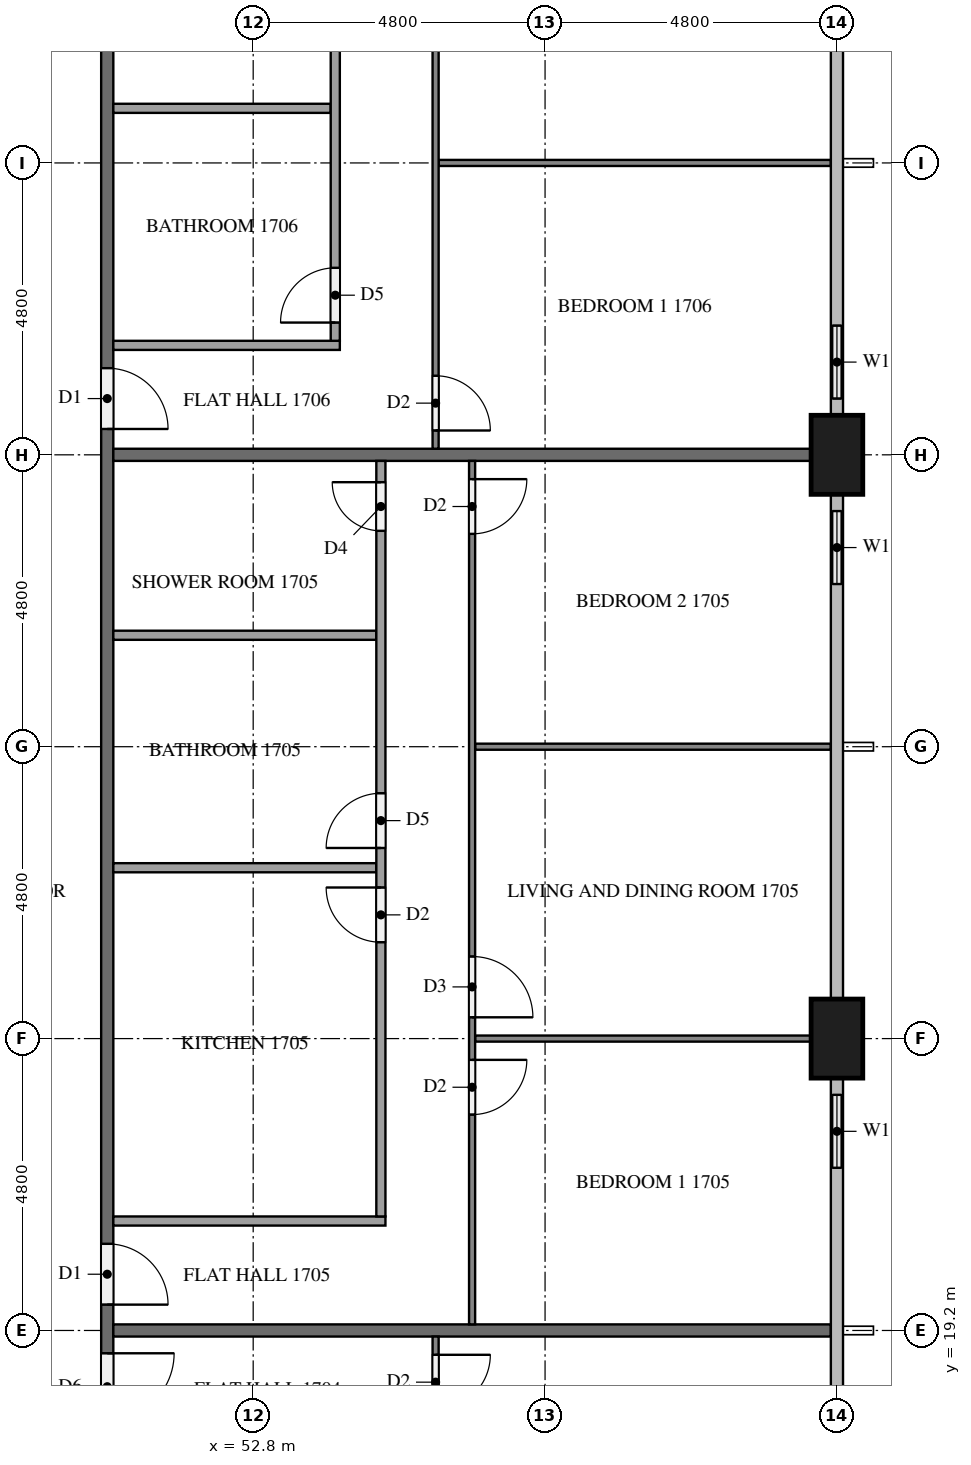
"""IFC4 building model, lengths in metres.
Left out: names, types, materials, properties, quantities, classifications, styles, units other than length and angle.
Written with IfcOpenShell. Run it as: python <this file> out.ifc"""

import sys

from ifc_helpers import new_model, si_unit, direction, frame, frame_2d, origin, origin_2d, place, context, subcontext, project, spatial, rectangle, extrude, element, fill, save


model = new_model("IFC4")
c1 = context("Model", 3, precision=1e-05, world=origin(), true_north=direction((0.0, 1.0)))
c2 = subcontext(c1, "Body", "Model", "MODEL_VIEW")
j1 = project(units=[si_unit("LENGTHUNIT", "METRE"), si_unit("PLANEANGLEUNIT", "RADIAN")], contexts=[c1])
p1 = place(None, origin())
s1 = spatial("IfcSite", under=j1, at=p1, CompositionType="ELEMENT")
p2 = place(p1, origin())
s2 = spatial("IfcBuilding", under=s1, at=p2, CompositionType="ELEMENT")
p3 = place(p2, frame((0.0, 0.0, 69.8)))
s3 = spatial("IfcBuildingStorey", under=s2, at=p3, CompositionType="ELEMENT", Elevation=69.8)
for number, where, z_axis, x_axis in (
    (1, (62.4, 24.0, 0.0), (0.0, 0.0, 1.0), (0.0, 1.0, 0.0)),
    (2, (62.4, 33.6, 0.0), (0.0, 0.0, 1.0), (0.0, 1.0, 0.0)),
):
    element("IfcColumn", number, at=place(p3, frame(where, z_axis=z_axis, x_axis=x_axis)), inside=s3, PredefinedType="COLUMN", context=c2, shape_type="SweptSolid", body=[
        extrude(rectangle(XDim=1.3, YDim=0.85, at=origin_2d()), origin(), (0.0, 0.0, 1.0), 3.2),
    ])
p4 = place(p3, frame((62.4, 21.6, 0.0), z_axis=(0.0, 0.0, 1.0), x_axis=(0.0, 1.0, 0.0)))
e3 = element("IfcWall", 3, at=p4, inside=s3, PredefinedType="SOLIDWALL", context=c2, shape_type="SweptSolid", body=[
    extrude(rectangle(XDim=1.75, YDim=0.15, at=frame_2d((0.875, 0.0))), origin(), (0.0, 0.0, 1.0), 3.2),
])
p5 = place(p4, frame((0.275, 0.0, 0.9)))
e4 = element("IfcOpeningElement", 4, at=p5, cuts=e3, PredefinedType="OPENING", context=c2, shape_type="SweptSolid", body=[
    extrude(rectangle(XDim=1.2, YDim=1.4, at=frame_2d((0.6, 0.7))), frame((0.0, 0.085, 0.0), z_axis=(0.0, -1.0, 0.0), x_axis=(1.0, 0.0, 0.0)), (0.0, 0.0, 1.0), 0.17),
])
p6 = place(p3, frame((62.4, 31.2, 0.0), z_axis=(0.0, 0.0, 1.0), x_axis=(0.0, 1.0, 0.0)))
e5 = element("IfcWall", 5, at=p6, inside=s3, PredefinedType="SOLIDWALL", context=c2, shape_type="SweptSolid", body=[
    extrude(rectangle(XDim=1.75, YDim=0.15, at=frame_2d((0.875, 0.0))), origin(), (0.0, 0.0, 1.0), 3.2),
])
p7 = place(p6, frame((0.275, 0.0, 0.9)))
e6 = element("IfcOpeningElement", 6, at=p7, cuts=e5, PredefinedType="OPENING", context=c2, shape_type="SweptSolid", body=[
    extrude(rectangle(XDim=1.2, YDim=1.4, at=frame_2d((0.6, 0.7))), frame((0.0, 0.085, 0.0), z_axis=(0.0, -1.0, 0.0), x_axis=(1.0, 0.0, 0.0)), (0.0, 0.0, 1.0), 0.17),
])
p8 = place(p3, frame((62.4, 34.25, 0.0), z_axis=(0.0, 0.0, 1.0), x_axis=(0.0, 1.0, 0.0)))
e7 = element("IfcWall", 7, at=p8, inside=s3, PredefinedType="SOLIDWALL", context=c2, shape_type="SweptSolid", body=[
    extrude(rectangle(XDim=1.75, YDim=0.15, at=frame_2d((0.875, 0.0))), origin(), (0.0, 0.0, 1.0), 3.2),
])
p9 = place(p8, frame((0.275, 0.0, 0.9)))
e8 = element("IfcOpeningElement", 8, at=p9, cuts=e7, PredefinedType="OPENING", context=c2, shape_type="SweptSolid", body=[
    extrude(rectangle(XDim=1.2, YDim=1.4, at=frame_2d((0.6, 0.7))), frame((0.0, 0.085, 0.0), z_axis=(0.0, -1.0, 0.0), x_axis=(1.0, 0.0, 0.0)), (0.0, 0.0, 1.0), 0.17),
])
p10 = place(p3, frame((50.4, 40.7, 0.0), z_axis=(0.0, 0.0, 1.0), x_axis=(0.0, -1.0, 0.0)))
e9 = element("IfcWall", 9, at=p10, inside=s3, PredefinedType="PARTITIONING", context=c2, shape_type="SweptSolid", body=[
    extrude(rectangle(XDim=28.6, YDim=0.2, at=frame_2d((14.3, 0.0))), origin(), (0.0, 0.0, 1.0), 3.2),
])
p11 = place(p10, frame((21.875, 0.0, 0.0)))
e10 = element("IfcOpeningElement", 10, at=p11, cuts=e9, PredefinedType="OPENING", context=c2, shape_type="SweptSolid", body=[
    extrude(rectangle(XDim=1.1, YDim=2.1, at=frame_2d((0.55, 1.05))), frame((0.0, 0.11, 0.0), z_axis=(0.0, -1.0, 0.0), x_axis=(1.0, 0.0, 0.0)), (0.0, 0.0, 1.0), 0.22),
])
p12 = place(p10, frame((20.075, 0.0, 0.0)))
e11 = element("IfcOpeningElement", 11, at=p12, cuts=e9, PredefinedType="OPENING", context=c2, shape_type="SweptSolid", body=[
    extrude(rectangle(XDim=1.0, YDim=2.1, at=frame_2d((0.5, 1.05))), frame((0.0, 0.11, 0.0), z_axis=(0.0, -1.0, 0.0), x_axis=(1.0, 0.0, 0.0)), (0.0, 0.0, 1.0), 0.22),
])
p13 = place(p10, frame((5.675, 0.0, 0.0)))
e12 = element("IfcOpeningElement", 12, at=p13, cuts=e9, PredefinedType="OPENING", context=c2, shape_type="SweptSolid", body=[
    extrude(rectangle(XDim=1.0, YDim=2.1, at=frame_2d((0.5, 1.05))), frame((0.0, 0.11, 0.0), z_axis=(0.0, -1.0, 0.0), x_axis=(1.0, 0.0, 0.0)), (0.0, 0.0, 1.0), 0.22),
])
p14 = place(p3, frame((50.5, 19.2, 0.0), z_axis=(0.0, 0.0, 1.0), x_axis=(1.0, 0.0, 0.0)))
e13 = element("IfcWall", 13, at=p14, inside=s3, PredefinedType="PARTITIONING", context=c2, shape_type="SweptSolid", body=[
    extrude(rectangle(XDim=11.8, YDim=0.2, at=frame_2d((5.9, 0.0))), origin(), (0.0, 0.0, 1.0), 3.2),
])
p15 = place(p3, frame((50.5, 33.6, 0.0), z_axis=(0.0, 0.0, 1.0), x_axis=(1.0, 0.0, 0.0)))
e14 = element("IfcWall", 14, at=p15, inside=s3, PredefinedType="PARTITIONING", context=c2, shape_type="SweptSolid", body=[
    extrude(rectangle(XDim=11.475, YDim=0.2, at=frame_2d((5.738, 0.0))), origin(), (0.0, 0.0, 1.0), 3.2),
])
p16 = place(p3, frame((55.8, 19.1, 0.0), z_axis=(0.0, 0.0, 1.0), x_axis=(0.0, -1.0, 0.0)))
e15 = element("IfcWall", 15, at=p16, inside=s3, PredefinedType="PARTITIONING", context=c2, shape_type="SweptSolid", body=[
    extrude(rectangle(XDim=19.0, YDim=0.1, at=frame_2d((9.5, 0.0))), origin(), (0.0, 0.0, 1.0), 3.2),
])
p17 = place(p16, frame((0.3, 0.0, 0.0)))
e16 = element("IfcOpeningElement", 16, at=p17, cuts=e15, PredefinedType="OPENING", context=c2, shape_type="SweptSolid", body=[
    extrude(rectangle(XDim=0.9, YDim=2.1, at=frame_2d((0.45, 1.05))), frame((0.0, 0.06, 0.0), z_axis=(0.0, -1.0, 0.0), x_axis=(1.0, 0.0, 0.0)), (0.0, 0.0, 1.0), 0.12),
])
p18 = place(p16, frame((8.15, 0.0, 0.0)))
e17 = element("IfcOpeningElement", 17, at=p18, cuts=e15, PredefinedType="OPENING", context=c2, shape_type="SweptSolid", body=[
    extrude(rectangle(XDim=1.0, YDim=2.1, at=frame_2d((0.5, 1.05))), frame((0.0, 0.06, 0.0), z_axis=(0.0, -1.0, 0.0), x_axis=(1.0, 0.0, 0.0)), (0.0, 0.0, 1.0), 0.12),
])
p19 = place(p16, frame((9.85, 0.0, 0.0)))
e18 = element("IfcOpeningElement", 18, at=p19, cuts=e15, PredefinedType="OPENING", context=c2, shape_type="SweptSolid", body=[
    extrude(rectangle(XDim=0.9, YDim=2.1, at=frame_2d((0.45, 1.05))), frame((0.0, 0.06, 0.0), z_axis=(0.0, -1.0, 0.0), x_axis=(1.0, 0.0, 0.0)), (0.0, 0.0, 1.0), 0.12),
])
p20 = place(p16, frame((17.6, 0.0, 0.0)))
e19 = element("IfcOpeningElement", 19, at=p20, cuts=e15, PredefinedType="OPENING", context=c2, shape_type="SweptSolid", body=[
    extrude(rectangle(XDim=0.9, YDim=2.1, at=frame_2d((0.45, 1.05))), frame((0.0, 0.06, 0.0), z_axis=(0.0, -1.0, 0.0), x_axis=(1.0, 0.0, 0.0)), (0.0, 0.0, 1.0), 0.12),
])
p21 = place(p3, frame((56.45, 24.0, 0.0), z_axis=(0.0, 0.0, 1.0), x_axis=(1.0, 0.0, 0.0)))
e20 = element("IfcWall", 20, at=p21, inside=s3, PredefinedType="PARTITIONING", context=c2, shape_type="SweptSolid", body=[
    extrude(rectangle(XDim=5.525, YDim=0.1, at=frame_2d((2.763, 0.0))), origin(), (0.0, 0.0, 1.0), 3.2),
])
p22 = place(p3, frame((56.45, 28.8, 0.0), z_axis=(0.0, 0.0, 1.0), x_axis=(1.0, 0.0, 0.0)))
e21 = element("IfcWall", 21, at=p22, inside=s3, PredefinedType="PARTITIONING", context=c2, shape_type="SweptSolid", body=[
    extrude(rectangle(XDim=5.85, YDim=0.1, at=frame_2d((2.925, 0.0))), origin(), (0.0, 0.0, 1.0), 3.2),
])
p23 = place(p3, frame((56.4, 33.5, 0.0), z_axis=(0.0, 0.0, 1.0), x_axis=(0.0, -1.0, 0.0)))
e22 = element("IfcWall", 22, at=p23, inside=s3, PredefinedType="PARTITIONING", context=c2, shape_type="SweptSolid", body=[
    extrude(rectangle(XDim=14.2, YDim=0.1, at=frame_2d((7.1, 0.0))), origin(), (0.0, 0.0, 1.0), 3.2),
])
p24 = place(p23, frame((9.85, 0.0, 0.0)))
e23 = element("IfcOpeningElement", 23, at=p24, cuts=e22, PredefinedType="OPENING", context=c2, shape_type="SweptSolid", body=[
    extrude(rectangle(XDim=0.9, YDim=2.1, at=frame_2d((0.45, 1.05))), frame((0.0, 0.06, 0.0), z_axis=(0.0, -1.0, 0.0), x_axis=(1.0, 0.0, 0.0)), (0.0, 0.0, 1.0), 0.12),
])
p25 = place(p23, frame((8.15, 0.0, 0.0)))
e24 = element("IfcOpeningElement", 24, at=p25, cuts=e22, PredefinedType="OPENING", context=c2, shape_type="SweptSolid", body=[
    extrude(rectangle(XDim=1.0, YDim=2.1, at=frame_2d((0.5, 1.05))), frame((0.0, 0.06, 0.0), z_axis=(0.0, -1.0, 0.0), x_axis=(1.0, 0.0, 0.0)), (0.0, 0.0, 1.0), 0.12),
])
p26 = place(p23, frame((0.3, 0.0, 0.0)))
e25 = element("IfcOpeningElement", 25, at=p26, cuts=e22, PredefinedType="OPENING", context=c2, shape_type="SweptSolid", body=[
    extrude(rectangle(XDim=0.9, YDim=2.1, at=frame_2d((0.45, 1.05))), frame((0.0, 0.06, 0.0), z_axis=(0.0, -1.0, 0.0), x_axis=(1.0, 0.0, 0.0)), (0.0, 0.0, 1.0), 0.12),
])
for number, where, z_axis, x_axis in (
    (26, (50.5, 26.81, 0.0), (0.0, 0.0, 1.0), (1.0, 0.0, 0.0)),
    (27, (50.5, 30.633, 0.0), (0.0, 0.0, 1.0), (1.0, 0.0, 0.0)),
):
    element("IfcWall", number, at=place(p3, frame(where, z_axis=z_axis, x_axis=x_axis)), inside=s3, PredefinedType="PARTITIONING", context=c2, shape_type="SweptSolid", body=[
        extrude(rectangle(XDim=4.325, YDim=0.15, at=frame_2d((2.163, 0.0))), origin(), (0.0, 0.0, 1.0), 3.2),
    ])
p27 = place(p3, frame((50.5, 21.0, 0.0), z_axis=(0.0, 0.0, 1.0), x_axis=(1.0, 0.0, 0.0)))
e28 = element("IfcWall", 28, at=p27, inside=s3, PredefinedType="PARTITIONING", context=c2, shape_type="SweptSolid", body=[
    extrude(rectangle(XDim=4.475, YDim=0.15, at=frame_2d((2.238, 0.0))), origin(), (0.0, 0.0, 1.0), 3.2),
])
p28 = place(p3, frame((54.9, 21.075, 0.0), z_axis=(0.0, 0.0, 1.0), x_axis=(0.0, 1.0, 0.0)))
e29 = element("IfcWall", 29, at=p28, inside=s3, PredefinedType="PARTITIONING", context=c2, shape_type="SweptSolid", body=[
    extrude(rectangle(XDim=12.425, YDim=0.15, at=frame_2d((6.212, 0.0))), origin(), (0.0, 0.0, 1.0), 3.2),
])
p29 = place(p28, frame((4.51, 0.0, 0.0)))
e30 = element("IfcOpeningElement", 30, at=p29, cuts=e29, PredefinedType="OPENING", context=c2, shape_type="SweptSolid", body=[
    extrude(rectangle(XDim=0.9, YDim=2.1, at=frame_2d((0.45, 1.05))), frame((0.0, 0.085, 0.0), z_axis=(0.0, -1.0, 0.0), x_axis=(1.0, 0.0, 0.0)), (0.0, 0.0, 1.0), 0.17),
])
p30 = place(p28, frame((6.06, 0.0, 0.0)))
e31 = element("IfcOpeningElement", 31, at=p30, cuts=e29, PredefinedType="OPENING", context=c2, shape_type="SweptSolid", body=[
    extrude(rectangle(XDim=0.9, YDim=2.1, at=frame_2d((0.45, 1.05))), frame((0.0, 0.085, 0.0), z_axis=(0.0, -1.0, 0.0), x_axis=(1.0, 0.0, 0.0)), (0.0, 0.0, 1.0), 0.17),
])
p31 = place(p28, frame((11.275, 0.0, 0.0)))
e32 = element("IfcOpeningElement", 32, at=p31, cuts=e29, PredefinedType="OPENING", context=c2, shape_type="SweptSolid", body=[
    extrude(rectangle(XDim=0.8, YDim=2.1, at=frame_2d((0.4, 1.05))), frame((0.0, 0.085, 0.0), z_axis=(0.0, -1.0, 0.0), x_axis=(1.0, 0.0, 0.0)), (0.0, 0.0, 1.0), 0.17),
])
p32 = place(p3, frame((55.85, 38.4, 0.0), z_axis=(0.0, 0.0, 1.0), x_axis=(1.0, 0.0, 0.0)))
e33 = element("IfcWall", 33, at=p32, inside=s3, PredefinedType="PARTITIONING", context=c2, shape_type="SweptSolid", body=[
    extrude(rectangle(XDim=6.45, YDim=0.1, at=frame_2d((3.225, 0.0))), origin(), (0.0, 0.0, 1.0), 3.2),
])
p33 = place(p3, frame((55.8, 47.9, 0.0), z_axis=(0.0, 0.0, 1.0), x_axis=(0.0, -1.0, 0.0)))
e34 = element("IfcWall", 34, at=p33, inside=s3, PredefinedType="PARTITIONING", context=c2, shape_type="SweptSolid", body=[
    extrude(rectangle(XDim=14.2, YDim=0.1, at=frame_2d((7.1, 0.0))), origin(), (0.0, 0.0, 1.0), 3.2),
])
p34 = place(p33, frame((13.0, 0.0, 0.0)))
e35 = element("IfcOpeningElement", 35, at=p34, cuts=e34, PredefinedType="OPENING", context=c2, shape_type="SweptSolid", body=[
    extrude(rectangle(XDim=0.9, YDim=2.1, at=frame_2d((0.45, 1.05))), frame((0.0, 0.06, 0.0), z_axis=(0.0, -1.0, 0.0), x_axis=(1.0, 0.0, 0.0)), (0.0, 0.0, 1.0), 0.12),
])
p35 = place(p33, frame((5.05, 0.0, 0.0)))
e36 = element("IfcOpeningElement", 36, at=p35, cuts=e34, PredefinedType="OPENING", context=c2, shape_type="SweptSolid", body=[
    extrude(rectangle(XDim=0.9, YDim=2.1, at=frame_2d((0.45, 1.05))), frame((0.0, 0.06, 0.0), z_axis=(0.0, -1.0, 0.0), x_axis=(1.0, 0.0, 0.0)), (0.0, 0.0, 1.0), 0.12),
])
p36 = place(p33, frame((3.35, 0.0, 0.0)))
e37 = element("IfcOpeningElement", 37, at=p36, cuts=e34, PredefinedType="OPENING", context=c2, shape_type="SweptSolid", body=[
    extrude(rectangle(XDim=1.0, YDim=2.1, at=frame_2d((0.5, 1.05))), frame((0.0, 0.06, 0.0), z_axis=(0.0, -1.0, 0.0), x_axis=(1.0, 0.0, 0.0)), (0.0, 0.0, 1.0), 0.12),
])
p37 = place(p3, frame((50.5, 39.298, 0.0), z_axis=(0.0, 0.0, 1.0), x_axis=(1.0, 0.0, 0.0)))
e38 = element("IfcWall", 38, at=p37, inside=s3, PredefinedType="PARTITIONING", context=c2, shape_type="SweptSolid", body=[
    extrude(rectangle(XDim=3.575, YDim=0.15, at=frame_2d((1.788, 0.0))), origin(), (0.0, 0.0, 1.0), 3.2),
])
p38 = place(p3, frame((50.5, 35.4, 0.0), z_axis=(0.0, 0.0, 1.0), x_axis=(1.0, 0.0, 0.0)))
e39 = element("IfcWall", 39, at=p38, inside=s3, PredefinedType="PARTITIONING", context=c2, shape_type="SweptSolid", body=[
    extrude(rectangle(XDim=3.725, YDim=0.15, at=frame_2d((1.863, 0.0))), origin(), (0.0, 0.0, 1.0), 3.2),
])
p39 = place(p3, frame((54.15, 35.475, 0.0), z_axis=(0.0, 0.0, 1.0), x_axis=(0.0, 1.0, 0.0)))
e40 = element("IfcWall", 40, at=p39, inside=s3, PredefinedType="PARTITIONING", context=c2, shape_type="SweptSolid", body=[
    extrude(rectangle(XDim=12.425, YDim=0.15, at=frame_2d((6.212, 0.0))), origin(), (0.0, 0.0, 1.0), 3.2),
])
p40 = place(p39, frame((0.3, 0.0, 0.0)))
e41 = element("IfcOpeningElement", 41, at=p40, cuts=e40, PredefinedType="OPENING", context=c2, shape_type="SweptSolid", body=[
    extrude(rectangle(XDim=0.9, YDim=2.1, at=frame_2d((0.45, 1.05))), frame((0.0, 0.085, 0.0), z_axis=(0.0, -1.0, 0.0), x_axis=(1.0, 0.0, 0.0)), (0.0, 0.0, 1.0), 0.17),
])
p41 = place(p39, frame((8.333, 0.0, 0.0)))
e42 = element("IfcOpeningElement", 42, at=p41, cuts=e40, PredefinedType="OPENING", context=c2, shape_type="SweptSolid", body=[
    extrude(rectangle(XDim=0.9, YDim=2.1, at=frame_2d((0.45, 1.05))), frame((0.0, 0.085, 0.0), z_axis=(0.0, -1.0, 0.0), x_axis=(1.0, 0.0, 0.0)), (0.0, 0.0, 1.0), 0.17),
])
p42 = place(p39, frame((9.883, 0.0, 0.0)))
e43 = element("IfcOpeningElement", 43, at=p42, cuts=e40, PredefinedType="OPENING", context=c2, shape_type="SweptSolid", body=[
    extrude(rectangle(XDim=0.8, YDim=2.1, at=frame_2d((0.4, 1.05))), frame((0.0, 0.085, 0.0), z_axis=(0.0, -1.0, 0.0), x_axis=(1.0, 0.0, 0.0)), (0.0, 0.0, 1.0), 0.17),
])
p43 = place(p5, origin())
e44 = element("IfcWindow", 44, at=p43, inside=s3, PartitioningType="SINGLE_PANEL", PredefinedType="WINDOW", context=c2, shape_type="SweptSolid", body=[
    extrude(rectangle(XDim=1.2, YDim=1.4, at=frame_2d((0.6, 0.7))), frame((0.0, 0.03, 0.0), z_axis=(0.0, -1.0, 0.0), x_axis=(1.0, 0.0, 0.0)), (0.0, 0.0, 1.0), 0.06),
])
fill(e4, e44)
p44 = place(p7, origin())
e45 = element("IfcWindow", 45, at=p44, inside=s3, PartitioningType="SINGLE_PANEL", PredefinedType="WINDOW", context=c2, shape_type="SweptSolid", body=[
    extrude(rectangle(XDim=1.2, YDim=1.4, at=frame_2d((0.6, 0.7))), frame((0.0, 0.03, 0.0), z_axis=(0.0, -1.0, 0.0), x_axis=(1.0, 0.0, 0.0)), (0.0, 0.0, 1.0), 0.06),
])
fill(e6, e45)
p45 = place(p9, origin())
e46 = element("IfcWindow", 46, at=p45, inside=s3, PartitioningType="SINGLE_PANEL", PredefinedType="WINDOW", context=c2, shape_type="SweptSolid", body=[
    extrude(rectangle(XDim=1.2, YDim=1.4, at=frame_2d((0.6, 0.7))), frame((0.0, 0.03, 0.0), z_axis=(0.0, -1.0, 0.0), x_axis=(1.0, 0.0, 0.0)), (0.0, 0.0, 1.0), 0.06),
])
fill(e8, e46)
p46 = place(p11, origin())
e47 = element("IfcDoor", 47, at=p46, inside=s3, OperationType="SINGLE_SWING_LEFT", PredefinedType="DOOR", context=c2, shape_type="SweptSolid", body=[
    extrude(rectangle(XDim=1.1, YDim=2.1, at=frame_2d((0.55, 1.05))), frame((0.0, 0.025, 0.0), z_axis=(0.0, -1.0, 0.0), x_axis=(1.0, 0.0, 0.0)), (0.0, 0.0, 1.0), 0.05),
])
fill(e10, e47)
p47 = place(p12, origin())
e48 = element("IfcDoor", 48, at=p47, inside=s3, OperationType="SINGLE_SWING_RIGHT", PredefinedType="DOOR", context=c2, shape_type="SweptSolid", body=[
    extrude(rectangle(XDim=1.0, YDim=2.1, at=frame_2d((0.5, 1.05))), frame((0.0, 0.025, 0.0), z_axis=(0.0, -1.0, 0.0), x_axis=(1.0, 0.0, 0.0)), (0.0, 0.0, 1.0), 0.05),
])
fill(e11, e48)
p48 = place(p13, origin())
e49 = element("IfcDoor", 49, at=p48, inside=s3, OperationType="SINGLE_SWING_RIGHT", PredefinedType="DOOR", context=c2, shape_type="SweptSolid", body=[
    extrude(rectangle(XDim=1.0, YDim=2.1, at=frame_2d((0.5, 1.05))), frame((0.0, 0.025, 0.0), z_axis=(0.0, -1.0, 0.0), x_axis=(1.0, 0.0, 0.0)), (0.0, 0.0, 1.0), 0.05),
])
fill(e12, e49)
p49 = place(p17, origin())
e50 = element("IfcDoor", 50, at=p49, inside=s3, OperationType="SINGLE_SWING_LEFT", PredefinedType="DOOR", context=c2, shape_type="SweptSolid", body=[
    extrude(rectangle(XDim=0.9, YDim=2.1, at=frame_2d((0.45, 1.05))), frame((0.0, 0.025, 0.0), z_axis=(0.0, -1.0, 0.0), x_axis=(1.0, 0.0, 0.0)), (0.0, 0.0, 1.0), 0.05),
])
fill(e16, e50)
p50 = place(p24, origin())
e51 = element("IfcDoor", 51, at=p50, inside=s3, OperationType="SINGLE_SWING_LEFT", PredefinedType="DOOR", context=c2, shape_type="SweptSolid", body=[
    extrude(rectangle(XDim=0.9, YDim=2.1, at=frame_2d((0.45, 1.05))), frame((0.0, 0.025, 0.0), z_axis=(0.0, -1.0, 0.0), x_axis=(1.0, 0.0, 0.0)), (0.0, 0.0, 1.0), 0.05),
])
fill(e23, e51)
p51 = place(p25, origin())
e52 = element("IfcDoor", 52, at=p51, inside=s3, OperationType="SINGLE_SWING_RIGHT", PredefinedType="DOOR", context=c2, shape_type="SweptSolid", body=[
    extrude(rectangle(XDim=1.0, YDim=2.1, at=frame_2d((0.5, 1.05))), frame((0.0, 0.025, 0.0), z_axis=(0.0, -1.0, 0.0), x_axis=(1.0, 0.0, 0.0)), (0.0, 0.0, 1.0), 0.05),
])
fill(e24, e52)
p52 = place(p26, origin())
e53 = element("IfcDoor", 53, at=p52, inside=s3, OperationType="SINGLE_SWING_LEFT", PredefinedType="DOOR", context=c2, shape_type="SweptSolid", body=[
    extrude(rectangle(XDim=0.9, YDim=2.1, at=frame_2d((0.45, 1.05))), frame((0.0, 0.025, 0.0), z_axis=(0.0, -1.0, 0.0), x_axis=(1.0, 0.0, 0.0)), (0.0, 0.0, 1.0), 0.05),
])
fill(e25, e53)
p53 = place(p29, origin())
e54 = element("IfcDoor", 54, at=p53, inside=s3, OperationType="SINGLE_SWING_RIGHT", PredefinedType="DOOR", context=c2, shape_type="SweptSolid", body=[
    extrude(rectangle(XDim=0.9, YDim=2.1, at=frame_2d((0.45, 1.05))), frame((0.0, 0.025, 0.0), z_axis=(0.0, -1.0, 0.0), x_axis=(1.0, 0.0, 0.0)), (0.0, 0.0, 1.0), 0.05),
])
fill(e30, e54)
p54 = place(p30, origin())
e55 = element("IfcDoor", 55, at=p54, inside=s3, OperationType="SINGLE_SWING_LEFT", PredefinedType="DOOR", context=c2, shape_type="SweptSolid", body=[
    extrude(rectangle(XDim=0.9, YDim=2.1, at=frame_2d((0.45, 1.05))), frame((0.0, 0.025, 0.0), z_axis=(0.0, -1.0, 0.0), x_axis=(1.0, 0.0, 0.0)), (0.0, 0.0, 1.0), 0.05),
])
fill(e31, e55)
p55 = place(p31, origin())
e56 = element("IfcDoor", 56, at=p55, inside=s3, OperationType="SINGLE_SWING_RIGHT", PredefinedType="DOOR", context=c2, shape_type="SweptSolid", body=[
    extrude(rectangle(XDim=0.8, YDim=2.1, at=frame_2d((0.4, 1.05))), frame((0.0, 0.025, 0.0), z_axis=(0.0, -1.0, 0.0), x_axis=(1.0, 0.0, 0.0)), (0.0, 0.0, 1.0), 0.05),
])
fill(e32, e56)
p56 = place(p34, origin())
e57 = element("IfcDoor", 57, at=p56, inside=s3, OperationType="SINGLE_SWING_RIGHT", PredefinedType="DOOR", context=c2, shape_type="SweptSolid", body=[
    extrude(rectangle(XDim=0.9, YDim=2.1, at=frame_2d((0.45, 1.05))), frame((0.0, 0.025, 0.0), z_axis=(0.0, -1.0, 0.0), x_axis=(1.0, 0.0, 0.0)), (0.0, 0.0, 1.0), 0.05),
])
fill(e35, e57)
p57 = place(p40, origin())
e58 = element("IfcDoor", 58, at=p57, inside=s3, OperationType="SINGLE_SWING_LEFT", PredefinedType="DOOR", context=c2, shape_type="SweptSolid", body=[
    extrude(rectangle(XDim=0.9, YDim=2.1, at=frame_2d((0.45, 1.05))), frame((0.0, 0.025, 0.0), z_axis=(0.0, -1.0, 0.0), x_axis=(1.0, 0.0, 0.0)), (0.0, 0.0, 1.0), 0.05),
])
fill(e41, e58)
save(model, sys.argv[1])
